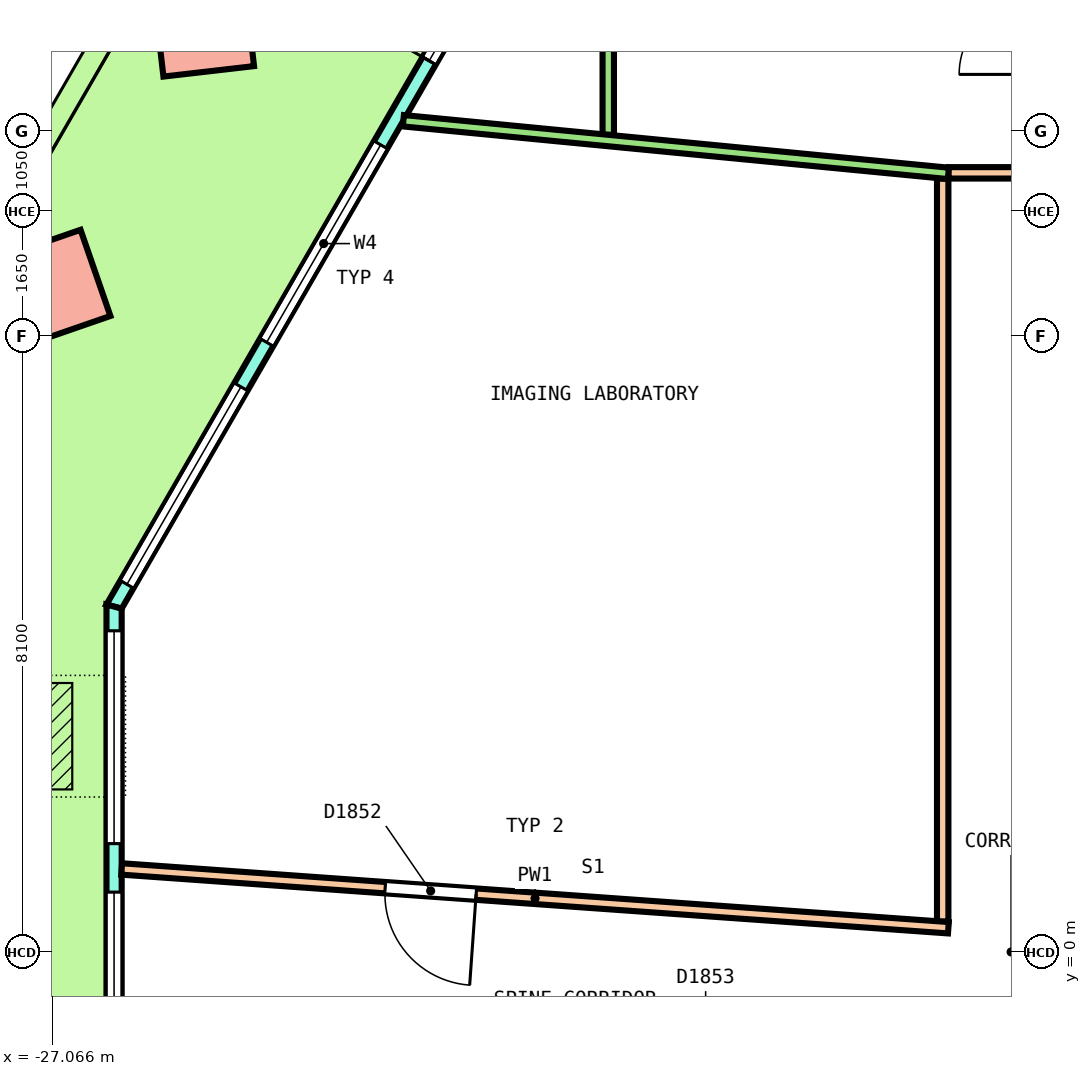
"""IFC4 building model, lengths in metres.
Left out: names, types, materials, properties, quantities, classifications, styles, units other than length and angle.
Written with IfcOpenShell. Run it as: python <this file> out.ifc"""

import sys

from ifc_helpers import new_model, si_unit, direction, frame, frame_2d, origin, origin_2d, place, context, subcontext, project, spatial, polyline, rectangle, outline, extrude, element, fill, save


model = new_model("IFC4")
c1 = context("Model", 3, precision=1e-05, world=origin(), true_north=direction((0.0, 1.0)))
c2 = subcontext(c1, "Body", "Model", "MODEL_VIEW")
j1 = project(units=[si_unit("LENGTHUNIT", "METRE"), si_unit("PLANEANGLEUNIT", "RADIAN")], contexts=[c1])
p1 = place(None, origin())
s1 = spatial("IfcSite", under=j1, at=p1, CompositionType="ELEMENT")
p2 = place(p1, origin())
s2 = spatial("IfcBuilding", under=s1, at=p2, CompositionType="ELEMENT")
p3 = place(p2, frame((0.0, 0.0, 180.4)))
s3 = spatial("IfcBuildingStorey", under=s2, at=p3, CompositionType="ELEMENT", Elevation=180.4)
p4 = place(p3, frame((-25.075, 12.181, 0.0), z_axis=(-0.025425794273, 0.018858468264, 0.999498817988), x_axis=(-0.499709914648, -0.866185208492, 0.003631224684)))
e1 = element("IfcColumn", 1, at=p4, inside=s3, PredefinedType="COLUMN", context=c2, shape_type="SweptSolid", body=[
    extrude(rectangle(XDim=1.2, YDim=1.2, at=origin_2d()), origin(), (0.0, 0.0, 1.0), 4.052),
])
p5 = place(p3, frame((-27.063, 8.738, 0.0), z_axis=(-0.021749390218, 0.025123256844, 0.9994477405), x_axis=(-0.500502362591, -0.865666942435, 0.01086875412)))
e2 = element("IfcColumn", 2, at=p5, inside=s3, PredefinedType="COLUMN", context=c2, shape_type="SweptSolid", body=[
    extrude(rectangle(XDim=1.2, YDim=1.2, at=origin_2d()), origin(), (0.0, 0.0, 1.0), 4.052),
])
p6 = place(p3, frame((-17.061, 20.463, 0.0), z_axis=(0.0, 0.0, 1.0), x_axis=(-0.499998761798, -0.866026118659, 0.0)))
e3 = element("IfcWall", 3, at=p6, inside=s3, PredefinedType="SOLIDWALL", context=c2, shape_type="SweptSolid", body=[
    extrude(outline(polyline([(-0.027, -0.1), (0.997, -0.1), (2.021, -0.1), (3.046, -0.1), (4.07, -0.1), (5.094, -0.1), (6.118, -0.1), (7.143, -0.1), (8.167, -0.1), (9.191, -0.1), (10.215, -0.1), (11.239, -0.1), (12.263, -0.1), (13.288, -0.1), (14.312, -0.1), (15.336, -0.1), (16.36, -0.1), (17.385, -0.1), (18.409, -0.1), (18.355, 0.1), (17.337, 0.1), (16.319, 0.1), (15.3, 0.1), (14.282, 0.1), (13.264, 0.1), (12.246, 0.1), (11.227, 0.1), (10.209, 0.1), (9.191, 0.1), (8.173, 0.1), (7.155, 0.1), (6.136, 0.1), (5.118, 0.1), (4.1, 0.1), (3.082, 0.1), (2.063, 0.1), (1.045, 0.1), (0.027, 0.1), (-0.027, -0.1)])), origin(), (0.0, 0.0, 1.0), 4.1),
])
p7 = place(p6, frame((0.338, 0.0, 0.1)))
e4 = element("IfcOpeningElement", 4, at=p7, cuts=e3, PredefinedType="OPENING", context=c2, shape_type="SweptSolid", body=[
    extrude(rectangle(XDim=3.0, YDim=2.9, at=frame_2d((1.5, 1.45))), frame((0.0, 0.11, 0.0), z_axis=(0.0, -1.0, 0.0), x_axis=(1.0, 0.0, 0.0)), (0.0, 0.0, 1.0), 0.22),
])
p8 = place(p6, frame((4.015, 0.0, 0.1)))
e5 = element("IfcOpeningElement", 5, at=p8, cuts=e3, PredefinedType="OPENING", context=c2, shape_type="SweptSolid", body=[
    extrude(rectangle(XDim=3.0, YDim=2.9, at=frame_2d((1.5, 1.45))), frame((0.0, 0.11, 0.0), z_axis=(0.0, -1.0, 0.0), x_axis=(1.0, 0.0, 0.0)), (0.0, 0.0, 1.0), 0.22),
])
p9 = place(p6, frame((8.291, 0.0, 0.0)))
e6 = element("IfcOpeningElement", 6, at=p9, cuts=e3, PredefinedType="OPENING", context=c2, shape_type="SweptSolid", body=[
    extrude(rectangle(XDim=1.8, YDim=2.4, at=frame_2d((0.9, 1.2))), frame((0.0, 0.11, 0.0), z_axis=(0.0, -1.0, 0.0), x_axis=(1.0, 0.0, 0.0)), (0.0, 0.0, 1.0), 0.22),
])
p10 = place(p6, frame((8.291, 0.0, 2.55)))
e7 = element("IfcOpeningElement", 7, at=p10, cuts=e3, PredefinedType="OPENING", context=c2, shape_type="SweptSolid", body=[
    extrude(rectangle(XDim=1.8, YDim=0.45, at=frame_2d((0.9, 0.225))), frame((0.0, 0.11, 0.0), z_axis=(0.0, -1.0, 0.0), x_axis=(1.0, 0.0, 0.0)), (0.0, 0.0, 1.0), 0.22),
])
p11 = place(p6, frame((11.367, 0.0, 0.1)))
e8 = element("IfcOpeningElement", 8, at=p11, cuts=e3, PredefinedType="OPENING", context=c2, shape_type="SweptSolid", body=[
    extrude(rectangle(XDim=3.0, YDim=2.9, at=frame_2d((1.5, 1.45))), frame((0.0, 0.11, 0.0), z_axis=(0.0, -1.0, 0.0), x_axis=(1.0, 0.0, 0.0)), (0.0, 0.0, 1.0), 0.22),
])
p12 = place(p6, frame((15.044, 0.0, 0.1)))
e9 = element("IfcOpeningElement", 9, at=p12, cuts=e3, PredefinedType="OPENING", context=c2, shape_type="SweptSolid", body=[
    extrude(rectangle(XDim=3.0, YDim=2.9, at=frame_2d((1.5, 1.45))), frame((0.0, 0.11, 0.0), z_axis=(0.0, -1.0, 0.0), x_axis=(1.0, 0.0, 0.0)), (0.0, 0.0, 1.0), 0.22),
])
p13 = place(p3, frame((-26.251, 4.543, 0.0), z_axis=(0.0, 0.0, 1.0), x_axis=(0.0, -1.0, 0.0)))
e10 = element("IfcWall", 10, at=p13, inside=s3, PredefinedType="SOLIDWALL", context=c2, shape_type="SweptSolid", body=[
    extrude(outline(polyline([(-0.027, -0.1), (1.128, -0.1), (2.282, -0.1), (3.437, -0.1), (4.592, -0.1), (5.747, -0.1), (6.901, -0.1), (6.848, 0.1), (5.711, 0.1), (4.574, 0.1), (3.437, 0.1), (2.301, 0.1), (1.164, 0.1), (0.027, 0.1), (-0.027, -0.1)])), origin(), (0.0, 0.0, 1.0), 4.1),
])
p14 = place(p13, frame((0.319, 0.0, 0.1)))
e11 = element("IfcOpeningElement", 11, at=p14, cuts=e10, PredefinedType="OPENING", context=c2, shape_type="SweptSolid", body=[
    extrude(rectangle(XDim=2.8, YDim=2.9, at=frame_2d((1.4, 1.45))), frame((0.0, 0.11, 0.0), z_axis=(0.0, -1.0, 0.0), x_axis=(1.0, 0.0, 0.0)), (0.0, 0.0, 1.0), 0.22),
])
p15 = place(p13, frame((3.756, 0.0, 0.1)))
e12 = element("IfcOpeningElement", 12, at=p15, cuts=e10, PredefinedType="OPENING", context=c2, shape_type="SweptSolid", body=[
    extrude(rectangle(XDim=2.8, YDim=2.9, at=frame_2d((1.4, 1.45))), frame((0.0, 0.11, 0.0), z_axis=(0.0, -1.0, 0.0), x_axis=(1.0, 0.0, 0.0)), (0.0, 0.0, 1.0), 0.22),
])
p16 = place(p3, frame((-15.275, 10.25, 0.0), z_axis=(0.0, 0.0, 1.0), x_axis=(1.0, 0.0, 0.0)))
e13 = element("IfcWall", 13, at=p16, inside=s3, PredefinedType="PARTITIONING", context=c2, shape_type="SweptSolid", body=[
    extrude(rectangle(XDim=30.55, YDim=0.15, at=frame_2d((15.275, 0.0))), origin(), (0.0, 0.0, 1.0), 3.05),
])
p17 = place(p16, frame((26.836, 0.0, 0.0)))
e14 = element("IfcOpeningElement", 14, at=p17, cuts=e13, PredefinedType="OPENING", context=c2, shape_type="SweptSolid", body=[
    extrude(rectangle(XDim=1.0, YDim=2.1, at=frame_2d((0.5, 1.05))), frame((0.0, 0.085, 0.0), z_axis=(0.0, -1.0, 0.0), x_axis=(1.0, 0.0, 0.0)), (0.0, 0.0, 1.0), 0.17),
])
p18 = place(p16, frame((13.785, 0.0, 0.0)))
e15 = element("IfcOpeningElement", 15, at=p18, cuts=e13, PredefinedType="OPENING", context=c2, shape_type="SweptSolid", body=[
    extrude(rectangle(XDim=1.2, YDim=2.1, at=frame_2d((0.6, 1.05))), frame((0.0, 0.085, 0.0), z_axis=(0.0, -1.0, 0.0), x_axis=(1.0, 0.0, 0.0)), (0.0, 0.0, 1.0), 0.17),
])
p19 = place(p3, frame((-15.35, 0.399, 0.0), z_axis=(0.0, 0.0, 1.0), x_axis=(0.0, 1.0, 0.0)))
e16 = element("IfcWall", 16, at=p19, inside=s3, PredefinedType="PARTITIONING", context=c2, shape_type="SweptSolid", body=[
    extrude(rectangle(XDim=9.776, YDim=0.15, at=frame_2d((4.888, 0.0))), origin(), (0.0, 0.0, 1.0), 3.05),
])
p20 = place(p3, frame((-26.152, 1.092, 0.0), z_axis=(0.0, 0.0, 1.0), x_axis=(0.997482737811, -0.070909715615, 0.0)))
e17 = element("IfcWall", 17, at=p20, inside=s3, PredefinedType="PARTITIONING", context=c2, shape_type="SweptSolid", body=[
    extrude(rectangle(XDim=10.904, YDim=0.15, at=frame_2d((5.452, 0.0))), origin(), (0.0, 0.0, 1.0), 3.05),
])
p21 = place(p20, frame((3.475, 0.0, 0.0)))
e18 = element("IfcOpeningElement", 18, at=p21, cuts=e17, PredefinedType="OPENING", context=c2, shape_type="SweptSolid", body=[
    extrude(rectangle(XDim=1.2, YDim=2.1, at=frame_2d((0.6, 1.05))), frame((0.0, 0.085, 0.0), z_axis=(0.0, -1.0, 0.0), x_axis=(1.0, 0.0, 0.0)), (0.0, 0.0, 1.0), 0.17),
])
p22 = place(p3, frame((-19.75, 10.75, 0.0), z_axis=(0.0, 0.0, 1.0), x_axis=(0.0, 1.0, 0.0)))
e19 = element("IfcWall", 19, at=p22, inside=s3, PredefinedType="PARTITIONING", context=c2, shape_type="SweptSolid", body=[
    extrude(rectangle(XDim=3.975, YDim=0.15, at=frame_2d((1.988, 0.0))), origin(), (0.0, 0.0, 1.0), 3.05),
])
p23 = place(p3, frame((-22.446, 10.935, 0.0), z_axis=(0.0, 0.0, 1.0), x_axis=(0.995370012711, -0.096117312678, 0.0)))
e20 = element("IfcWall", 20, at=p23, inside=s3, PredefinedType="PARTITIONING", context=c2, shape_type="SweptSolid", body=[
    extrude(rectangle(XDim=7.204, YDim=0.15, at=frame_2d((3.602, 0.0))), origin(), (0.0, 0.0, 1.0), 3.05),
])
p24 = place(p9, origin())
e21 = element("IfcDoor", 21, at=p24, inside=s3, OperationType="DOUBLE_DOOR_SINGLE_SWING", PredefinedType="DOOR", context=c2, shape_type="SweptSolid", body=[
    extrude(rectangle(XDim=1.8, YDim=2.4, at=frame_2d((0.9, 1.2))), frame((0.0, 0.025, 0.0), z_axis=(0.0, -1.0, 0.0), x_axis=(1.0, 0.0, 0.0)), (0.0, 0.0, 1.0), 0.05),
])
fill(e6, e21)
p25 = place(p10, origin())
e22 = element("IfcWindow", 22, at=p25, inside=s3, PartitioningType="SINGLE_PANEL", PredefinedType="WINDOW", context=c2, shape_type="SweptSolid", body=[
    extrude(rectangle(XDim=1.8, YDim=0.45, at=frame_2d((0.9, 0.225))), frame((0.0, 0.03, 0.0), z_axis=(0.0, -1.0, 0.0), x_axis=(1.0, 0.0, 0.0)), (0.0, 0.0, 1.0), 0.06),
])
fill(e7, e22)
p26 = place(p11, origin())
e23 = element("IfcWindow", 23, at=p26, inside=s3, PartitioningType="SINGLE_PANEL", PredefinedType="WINDOW", context=c2, shape_type="SweptSolid", body=[
    extrude(rectangle(XDim=3.0, YDim=2.9, at=frame_2d((1.5, 1.45))), frame((0.0, 0.03, 0.0), z_axis=(0.0, -1.0, 0.0), x_axis=(1.0, 0.0, 0.0)), (0.0, 0.0, 1.0), 0.06),
])
fill(e8, e23)
p27 = place(p12, origin())
e24 = element("IfcWindow", 24, at=p27, inside=s3, PartitioningType="SINGLE_PANEL", PredefinedType="WINDOW", context=c2, shape_type="SweptSolid", body=[
    extrude(rectangle(XDim=3.0, YDim=2.9, at=frame_2d((1.5, 1.45))), frame((0.0, 0.03, 0.0), z_axis=(0.0, -1.0, 0.0), x_axis=(1.0, 0.0, 0.0)), (0.0, 0.0, 1.0), 0.06),
])
fill(e9, e24)
p28 = place(p14, origin())
e25 = element("IfcWindow", 25, at=p28, inside=s3, PartitioningType="SINGLE_PANEL", PredefinedType="WINDOW", context=c2, shape_type="SweptSolid", body=[
    extrude(rectangle(XDim=2.8, YDim=2.9, at=frame_2d((1.4, 1.45))), frame((0.0, 0.03, 0.0), z_axis=(0.0, -1.0, 0.0), x_axis=(1.0, 0.0, 0.0)), (0.0, 0.0, 1.0), 0.06),
])
fill(e11, e25)
p29 = place(p15, origin())
e26 = element("IfcWindow", 26, at=p29, inside=s3, PartitioningType="SINGLE_PANEL", PredefinedType="WINDOW", context=c2, shape_type="SweptSolid", body=[
    extrude(rectangle(XDim=2.8, YDim=2.9, at=frame_2d((1.4, 1.45))), frame((0.0, 0.03, 0.0), z_axis=(0.0, -1.0, 0.0), x_axis=(1.0, 0.0, 0.0)), (0.0, 0.0, 1.0), 0.06),
])
fill(e12, e26)
p30 = place(p21, origin())
e27 = element("IfcDoor", 27, at=p30, inside=s3, OperationType="DOUBLE_DOOR_SINGLE_SWING", PredefinedType="DOOR", context=c2, shape_type="SweptSolid", body=[
    extrude(rectangle(XDim=1.2, YDim=2.1, at=frame_2d((0.6, 1.05))), frame((0.0, 0.025, 0.0), z_axis=(0.0, -1.0, 0.0), x_axis=(1.0, 0.0, 0.0)), (0.0, 0.0, 1.0), 0.05),
])
fill(e18, e27)
save(model, sys.argv[1])
